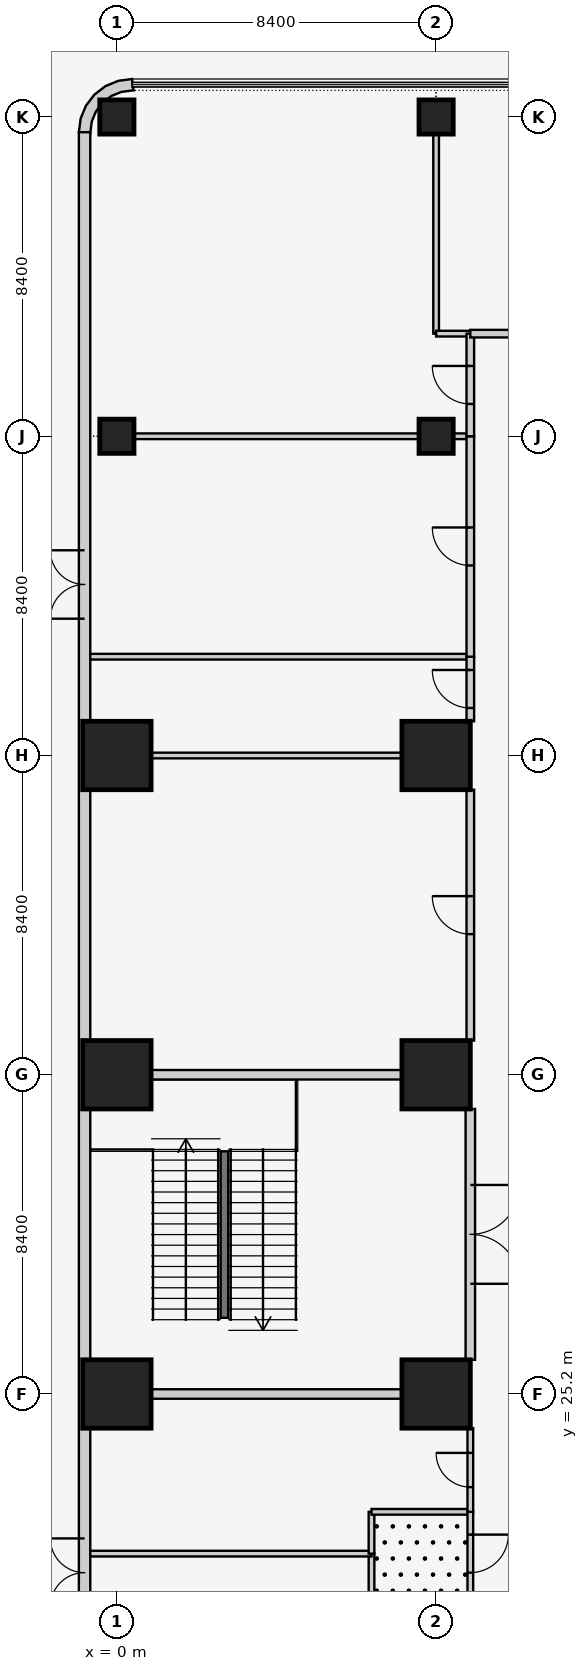
"""IFC4 building model, lengths in metres.
Left out: names, types, materials, properties, quantities, classifications, styles, units other than length and angle.
Written with IfcOpenShell. Run it as: python <this file> out.ifc"""

import sys

from ifc_helpers import new_model, si_unit, direction, frame, frame_2d, origin, origin_2d, place, context, subcontext, project, spatial, polyline, rectangle, outline, extrude, element, fill, save


model = new_model("IFC4")
c1 = context("Model", 3, precision=1e-05, world=origin(), true_north=direction((0.0, 1.0)))
c2 = subcontext(c1, "Body", "Model", "MODEL_VIEW")
j1 = project(units=[si_unit("LENGTHUNIT", "METRE"), si_unit("PLANEANGLEUNIT", "RADIAN")], contexts=[c1])
p1 = place(None, origin())
s1 = spatial("IfcSite", under=j1, at=p1, CompositionType="ELEMENT")
p2 = place(p1, origin())
s2 = spatial("IfcBuilding", under=s1, at=p2, CompositionType="ELEMENT")
p3 = place(p2, origin())
s3 = spatial("IfcBuildingStorey", under=s2, at=p3, CompositionType="ELEMENT", Elevation=0.0)
for number, where, z_axis, x_axis in (
    (1, (0.0, 25.2, 0.0), (0.0, 0.0, 1.0), (1.0, 0.0, 0.0)),
    (2, (0.0, 33.6, 0.0), (0.0, 0.0, 1.0), (1.0, 0.0, 0.0)),
    (3, (0.0, 42.0, 0.0), (0.0, 0.0, 1.0), (1.0, 0.0, 0.0)),
):
    element("IfcColumn", number, at=place(p3, frame(where, z_axis=z_axis, x_axis=x_axis)), inside=s3, PredefinedType="COLUMN", context=c2, shape_type="SweptSolid", body=[
        extrude(rectangle(XDim=1.8, YDim=1.8, at=origin_2d()), origin(), (0.0, 0.0, 1.0), 6.0),
    ])
for number, where, z_axis, x_axis in (
    (4, (0.0, 50.4, 0.0), (0.0, 0.0, 1.0), (1.0, 0.0, 0.0)),
    (5, (0.0, 58.8, 0.0), (0.0, 0.0, 1.0), (1.0, 0.0, 0.0)),
):
    element("IfcColumn", number, at=place(p3, frame(where, z_axis=z_axis, x_axis=x_axis)), inside=s3, PredefinedType="COLUMN", context=c2, shape_type="SweptSolid", body=[
        extrude(rectangle(XDim=0.9, YDim=0.9, at=origin_2d()), origin(), (0.0, 0.0, 1.0), 6.0),
    ])
for number, where, z_axis, x_axis in (
    (6, (8.4, 25.2, 0.0), (0.0, 0.0, 1.0), (1.0, 0.0, 0.0)),
    (7, (8.4, 33.6, 0.0), (0.0, 0.0, 1.0), (1.0, 0.0, 0.0)),
    (8, (8.4, 42.0, 0.0), (0.0, 0.0, 1.0), (1.0, 0.0, 0.0)),
):
    element("IfcColumn", number, at=place(p3, frame(where, z_axis=z_axis, x_axis=x_axis)), inside=s3, PredefinedType="COLUMN", context=c2, shape_type="SweptSolid", body=[
        extrude(rectangle(XDim=1.8, YDim=1.8, at=origin_2d()), origin(), (0.0, 0.0, 1.0), 6.0),
    ])
for number, where, z_axis, x_axis in (
    (9, (8.4, 50.4, 0.0), (0.0, 0.0, 1.0), (1.0, 0.0, 0.0)),
    (10, (8.4, 58.8, 0.0), (0.0, 0.0, 1.0), (1.0, 0.0, 0.0)),
):
    element("IfcColumn", number, at=place(p3, frame(where, z_axis=z_axis, x_axis=x_axis)), inside=s3, PredefinedType="COLUMN", context=c2, shape_type="SweptSolid", body=[
        extrude(rectangle(XDim=0.9, YDim=0.9, at=origin_2d()), origin(), (0.0, 0.0, 1.0), 6.0),
    ])
p4 = place(p3, frame((-0.85, 58.4, 0.0), z_axis=(0.0, 0.0, 1.0), x_axis=(0.0, -1.0, 0.0)))
e11 = element("IfcWall", 11, at=p4, inside=s3, PredefinedType="SOLIDWALL", context=c2, shape_type="SweptSolid", body=[
    extrude(rectangle(XDim=74.8, YDim=0.3, at=frame_2d((37.4, 0.0))), origin(), (0.0, 0.0, 1.0), 5.8),
])
p5 = place(p4, frame((68.0, 0.0, 0.0)))
e12 = element("IfcOpeningElement", 12, at=p5, cuts=e11, PredefinedType="OPENING", context=c2, shape_type="SweptSolid", body=[
    extrude(rectangle(XDim=1.8, YDim=2.4, at=frame_2d((0.9, 1.2))), frame((0.0, 0.16, 0.0), z_axis=(0.0, -1.0, 0.0), x_axis=(1.0, 0.0, 0.0)), (0.0, 0.0, 1.0), 0.32),
])
p6 = place(p4, frame((37.0, 0.0, 0.0)))
e13 = element("IfcOpeningElement", 13, at=p6, cuts=e11, PredefinedType="OPENING", context=c2, shape_type="SweptSolid", body=[
    extrude(rectangle(XDim=1.8, YDim=2.4, at=frame_2d((0.9, 1.2))), frame((0.0, 0.16, 0.0), z_axis=(0.0, -1.0, 0.0), x_axis=(1.0, 0.0, 0.0)), (0.0, 0.0, 1.0), 0.32),
])
p7 = place(p4, frame((11.0, 0.0, 0.0)))
e14 = element("IfcOpeningElement", 14, at=p7, cuts=e11, PredefinedType="OPENING", context=c2, shape_type="SweptSolid", body=[
    extrude(rectangle(XDim=1.8, YDim=2.4, at=frame_2d((0.9, 1.2))), frame((0.0, 0.16, 0.0), z_axis=(0.0, -1.0, 0.0), x_axis=(1.0, 0.0, 0.0)), (0.0, 0.0, 1.0), 0.32),
])
p8 = place(p3, frame((0.445, 59.648, 0.0), z_axis=(0.0, 0.0, 1.0), x_axis=(-0.707106781187, 0.707106781187, 0.0)))
e15 = element("IfcWall", 15, at=p8, inside=s3, PredefinedType="SOLIDWALL", context=c2, shape_type="SweptSolid", body=[
    extrude(outline(polyline([(0.139, 1.904), (-0.101, 1.72), (-0.087, 1.706), (0.1, 1.463), (0.209, 1.198), (0.247, 0.914), (0.209, 0.63), (0.1, 0.365), (-0.087, 0.122), (-0.101, 0.108), (0.139, -0.076), (0.362, 0.214), (0.502, 0.552), (0.549, 0.914), (0.502, 1.276), (0.362, 1.614), (0.139, 1.904)])), origin(), (0.0, 0.0, 1.0), 5.8),
])
p9 = place(p3, frame((6.7, 21.0, 0.0), z_axis=(0.0, 0.0, 1.0), x_axis=(0.0, -1.0, 0.0)))
e16 = element("IfcWall", 16, at=p9, inside=s3, PredefinedType="PARTITIONING", context=c2, shape_type="SweptSolid", body=[
    extrude(rectangle(XDim=1.1, YDim=0.15, at=frame_2d((0.55, 0.0))), origin(), (0.0, 0.0, 1.0), 5.8),
])
p10 = place(p3, frame((-0.7, 21.0, 0.0), z_axis=(0.0, 0.0, 1.0), x_axis=(1.0, 0.0, 0.0)))
e17 = element("IfcWall", 17, at=p10, inside=s3, PredefinedType="PARTITIONING", context=c2, shape_type="SweptSolid", body=[
    extrude(rectangle(XDim=7.4, YDim=0.15, at=frame_2d((3.7, 0.0))), origin(), (0.0, 0.0, 1.0), 5.8),
])
p11 = place(p3, frame((6.7, 21.0, 0.0), z_axis=(0.0, 0.0, 1.0), x_axis=(0.0, 1.0, 0.0)))
e18 = element("IfcWall", 18, at=p11, inside=s3, PredefinedType="PARTITIONING", context=c2, shape_type="SweptSolid", body=[
    extrude(rectangle(XDim=1.1, YDim=0.15, at=frame_2d((0.55, 0.0))), origin(), (0.0, 0.0, 1.0), 5.8),
])
p12 = place(p3, frame((6.7, 22.1, 0.0), z_axis=(0.0, 0.0, 1.0), x_axis=(1.0, 0.0, 0.0)))
e19 = element("IfcWall", 19, at=p12, inside=s3, PredefinedType="PARTITIONING", context=c2, shape_type="SweptSolid", body=[
    extrude(rectangle(XDim=2.6, YDim=0.15, at=frame_2d((1.3, 0.0))), origin(), (0.0, 0.0, 1.0), 5.8),
])
p13 = place(p3, frame((9.3, 22.1, 0.0), z_axis=(0.0, 0.0, 1.0), x_axis=(0.0, -1.0, 0.0)))
e20 = element("IfcWall", 20, at=p13, inside=s3, PredefinedType="PARTITIONING", context=c2, shape_type="SweptSolid", body=[
    extrude(rectangle(XDim=2.2, YDim=0.15, at=frame_2d((1.1, 0.0))), origin(), (0.0, 0.0, 1.0), 5.8),
])
p14 = place(p13, frame((0.6, 0.0, 0.0)))
e21 = element("IfcOpeningElement", 21, at=p14, cuts=e20, PredefinedType="OPENING", context=c2, shape_type="SweptSolid", body=[
    extrude(rectangle(XDim=1.0, YDim=2.1, at=frame_2d((0.5, 1.05))), frame((0.0, 0.085, 0.0), z_axis=(0.0, -1.0, 0.0), x_axis=(1.0, 0.0, 0.0)), (0.0, 0.0, 1.0), 0.17),
])
p15 = place(p3, frame((0.9, 25.2, 0.0), z_axis=(0.0, 0.0, 1.0), x_axis=(1.0, 0.0, 0.0)))
e22 = element("IfcWall", 22, at=p15, inside=s3, PredefinedType="SOLIDWALL", context=c2, shape_type="SweptSolid", body=[
    extrude(rectangle(XDim=6.6, YDim=0.25, at=frame_2d((3.3, 0.0))), origin(), (0.0, 0.0, 1.0), 5.043),
])
p16 = place(p3, frame((9.3, 24.3, 0.0), z_axis=(0.0, 0.0, 1.0), x_axis=(0.0, -1.0, 0.0)))
e23 = element("IfcWall", 23, at=p16, inside=s3, PredefinedType="PARTITIONING", context=c2, shape_type="SweptSolid", body=[
    extrude(rectangle(XDim=2.2, YDim=0.15, at=frame_2d((1.1, 0.0))), origin(), (0.0, 0.0, 1.0), 5.8),
])
p17 = place(p16, frame((0.65, 0.0, 0.0)))
e24 = element("IfcOpeningElement", 24, at=p17, cuts=e23, PredefinedType="OPENING", context=c2, shape_type="SweptSolid", body=[
    extrude(rectangle(XDim=0.9, YDim=2.1, at=frame_2d((0.45, 1.05))), frame((0.0, 0.085, 0.0), z_axis=(0.0, -1.0, 0.0), x_axis=(1.0, 0.0, 0.0)), (0.0, 0.0, 1.0), 0.17),
])
p18 = place(p3, frame((0.9, 33.6, 0.0), z_axis=(0.0, 0.0, 1.0), x_axis=(1.0, 0.0, 0.0)))
e25 = element("IfcWall", 25, at=p18, inside=s3, PredefinedType="SOLIDWALL", context=c2, shape_type="SweptSolid", body=[
    extrude(rectangle(XDim=6.6, YDim=0.25, at=frame_2d((3.3, 0.0))), origin(), (0.0, 0.0, 1.0), 5.043),
])
p19 = place(p3, frame((9.3, 32.7, 0.0), z_axis=(0.0, 0.0, 1.0), x_axis=(0.0, -1.0, 0.0)))
e26 = element("IfcWall", 26, at=p19, inside=s3, PredefinedType="SOLIDWALL", context=c2, shape_type="SweptSolid", body=[
    extrude(rectangle(XDim=6.6, YDim=0.25, at=frame_2d((3.3, 0.0))), origin(), (0.0, 0.0, 1.0), 5.8),
])
p20 = place(p19, frame((2.0, 0.0, 0.0)))
e27 = element("IfcOpeningElement", 27, at=p20, cuts=e26, PredefinedType="OPENING", context=c2, shape_type="SweptSolid", body=[
    extrude(rectangle(XDim=2.6, YDim=2.4, at=frame_2d((1.3, 1.2))), frame((0.0, 0.135, 0.0), z_axis=(0.0, -1.0, 0.0), x_axis=(1.0, 0.0, 0.0)), (0.0, 0.0, 1.0), 0.27),
])
p21 = place(p3, frame((0.9, 42.0, 0.0), z_axis=(0.0, 0.0, 1.0), x_axis=(1.0, 0.0, 0.0)))
e28 = element("IfcWall", 28, at=p21, inside=s3, PredefinedType="PARTITIONING", context=c2, shape_type="SweptSolid", body=[
    extrude(rectangle(XDim=6.6, YDim=0.15, at=frame_2d((3.3, 0.0))), origin(), (0.0, 0.0, 1.0), 5.043),
])
p22 = place(p3, frame((9.3, 41.1, 0.0), z_axis=(0.0, 0.0, 1.0), x_axis=(0.0, -1.0, 0.0)))
e29 = element("IfcWall", 29, at=p22, inside=s3, PredefinedType="PARTITIONING", context=c2, shape_type="SweptSolid", body=[
    extrude(rectangle(XDim=6.6, YDim=0.2, at=frame_2d((3.3, 0.0))), origin(), (0.0, 0.0, 1.0), 5.8),
])
p23 = place(p22, frame((2.8, 0.0, 0.0)))
e30 = element("IfcOpeningElement", 30, at=p23, cuts=e29, PredefinedType="OPENING", context=c2, shape_type="SweptSolid", body=[
    extrude(rectangle(XDim=1.0, YDim=2.1, at=frame_2d((0.5, 1.05))), frame((0.0, 0.11, 0.0), z_axis=(0.0, -1.0, 0.0), x_axis=(1.0, 0.0, 0.0)), (0.0, 0.0, 1.0), 0.22),
])
p24 = place(p3, frame((-0.7, 44.6, 0.0), z_axis=(0.0, 0.0, 1.0), x_axis=(1.0, 0.0, 0.0)))
e31 = element("IfcWall", 31, at=p24, inside=s3, PredefinedType="PARTITIONING", context=c2, shape_type="SweptSolid", body=[
    extrude(rectangle(XDim=10.0, YDim=0.15, at=frame_2d((5.0, 0.0))), origin(), (0.0, 0.0, 1.0), 5.8),
])
p25 = place(p3, frame((9.3, 44.6, 0.0), z_axis=(0.0, 0.0, 1.0), x_axis=(0.0, -1.0, 0.0)))
e32 = element("IfcWall", 32, at=p25, inside=s3, PredefinedType="PARTITIONING", context=c2, shape_type="SweptSolid", body=[
    extrude(rectangle(XDim=1.7, YDim=0.2, at=frame_2d((0.85, 0.0))), origin(), (0.0, 0.0, 1.0), 5.8),
])
p26 = place(p25, frame((0.35, 0.0, 0.0)))
e33 = element("IfcOpeningElement", 33, at=p26, cuts=e32, PredefinedType="OPENING", context=c2, shape_type="SweptSolid", body=[
    extrude(rectangle(XDim=1.0, YDim=2.1, at=frame_2d((0.5, 1.05))), frame((0.0, 0.11, 0.0), z_axis=(0.0, -1.0, 0.0), x_axis=(1.0, 0.0, 0.0)), (0.0, 0.0, 1.0), 0.22),
])
p27 = place(p3, frame((0.45, 50.4, 0.0), z_axis=(0.0, 0.0, 1.0), x_axis=(1.0, 0.0, 0.0)))
e34 = element("IfcWall", 34, at=p27, inside=s3, PredefinedType="PARTITIONING", context=c2, shape_type="SweptSolid", body=[
    extrude(rectangle(XDim=7.5, YDim=0.15, at=frame_2d((3.75, 0.0))), origin(), (0.0, 0.0, 1.0), 5.043),
])
p28 = place(p3, frame((8.85, 50.4, 0.0), z_axis=(0.0, 0.0, 1.0), x_axis=(1.0, 0.0, 0.0)))
e35 = element("IfcWall", 35, at=p28, inside=s3, PredefinedType="PARTITIONING", context=c2, shape_type="SweptSolid", body=[
    extrude(rectangle(XDim=0.45, YDim=0.15, at=frame_2d((0.225, 0.0))), origin(), (0.0, 0.0, 1.0), 5.043),
])
p29 = place(p3, frame((9.3, 50.4, 0.0), z_axis=(0.0, 0.0, 1.0), x_axis=(0.0, -1.0, 0.0)))
e36 = element("IfcWall", 36, at=p29, inside=s3, PredefinedType="PARTITIONING", context=c2, shape_type="SweptSolid", body=[
    extrude(rectangle(XDim=5.8, YDim=0.2, at=frame_2d((2.9, 0.0))), origin(), (0.0, 0.0, 1.0), 5.8),
])
p30 = place(p29, frame((2.4, 0.0, 0.0)))
e37 = element("IfcOpeningElement", 37, at=p30, cuts=e36, PredefinedType="OPENING", context=c2, shape_type="SweptSolid", body=[
    extrude(rectangle(XDim=1.0, YDim=2.1, at=frame_2d((0.5, 1.05))), frame((0.0, 0.11, 0.0), z_axis=(0.0, -1.0, 0.0), x_axis=(1.0, 0.0, 0.0)), (0.0, 0.0, 1.0), 0.22),
])
p31 = place(p3, frame((8.4, 58.35, 0.0), z_axis=(0.0, 0.0, 1.0), x_axis=(0.0, -1.0, 0.0)))
e38 = element("IfcWall", 38, at=p31, inside=s3, PredefinedType="PARTITIONING", context=c2, shape_type="SweptSolid", body=[
    extrude(rectangle(XDim=5.25, YDim=0.15, at=frame_2d((2.625, 0.0))), origin(), (0.0, 0.0, 1.0), 5.043),
])
p32 = place(p3, frame((8.4, 53.1, 0.0), z_axis=(0.0, 0.0, 1.0), x_axis=(1.0, 0.0, 0.0)))
e39 = element("IfcWall", 39, at=p32, inside=s3, PredefinedType="PARTITIONING", context=c2, shape_type="SweptSolid", body=[
    extrude(rectangle(XDim=0.9, YDim=0.15, at=frame_2d((0.45, 0.0))), origin(), (0.0, 0.0, 1.0), 5.8),
])
p33 = place(p3, frame((9.3, 53.1, 0.0), z_axis=(0.0, 0.0, 1.0), x_axis=(0.0, -1.0, 0.0)))
e40 = element("IfcWall", 40, at=p33, inside=s3, PredefinedType="PARTITIONING", context=c2, shape_type="SweptSolid", body=[
    extrude(rectangle(XDim=2.7, YDim=0.2, at=frame_2d((1.35, 0.0))), origin(), (0.0, 0.0, 1.0), 5.8),
])
p34 = place(p33, frame((0.85, 0.0, 0.0)))
e41 = element("IfcOpeningElement", 41, at=p34, cuts=e40, PredefinedType="OPENING", context=c2, shape_type="SweptSolid", body=[
    extrude(rectangle(XDim=1.0, YDim=2.1, at=frame_2d((0.5, 1.05))), frame((0.0, 0.11, 0.0), z_axis=(0.0, -1.0, 0.0), x_axis=(1.0, 0.0, 0.0)), (0.0, 0.0, 1.0), 0.22),
])
p35 = place(p3, frame((11.7, 53.1, 0.0), z_axis=(0.0, 0.0, 1.0), x_axis=(-1.0, 0.0, 0.0)))
e42 = element("IfcWall", 42, at=p35, inside=s3, PredefinedType="PARTITIONING", context=c2, shape_type="SweptSolid", body=[
    extrude(rectangle(XDim=2.4, YDim=0.2, at=frame_2d((1.2, 0.0))), origin(), (0.0, 0.0, 1.0), 5.8),
])
p36 = place(p3, frame((2.83, 27.205, 0.0), z_axis=(0.0, 0.0, 1.0), x_axis=(0.0, 1.0, 0.0)))
e43 = element("IfcWall", 43, at=p36, inside=s3, PredefinedType="SOLIDWALL", context=c2, shape_type="SweptSolid", body=[
    extrude(rectangle(XDim=4.38, YDim=0.2, at=frame_2d((2.19, 0.0))), origin(), (0.0, 0.0, 1.0), 6.0),
])
p37 = place(p6, frame((1.8, 0.0, 0.0), z_axis=(0.0, 0.0, 1.0), x_axis=(-1.0, 0.0, 0.0)))
e44 = element("IfcDoor", 44, at=p37, inside=s3, OperationType="DOUBLE_DOOR_SINGLE_SWING", PredefinedType="DOOR", context=c2, shape_type="SweptSolid", body=[
    extrude(rectangle(XDim=1.8, YDim=2.4, at=frame_2d((0.9, 1.2))), frame((0.0, 0.025, 0.0), z_axis=(0.0, -1.0, 0.0), x_axis=(1.0, 0.0, 0.0)), (0.0, 0.0, 1.0), 0.05),
])
fill(e13, e44)
p38 = place(p7, frame((1.8, 0.0, 0.0), z_axis=(0.0, 0.0, 1.0), x_axis=(-1.0, 0.0, 0.0)))
e45 = element("IfcDoor", 45, at=p38, inside=s3, OperationType="DOUBLE_DOOR_SINGLE_SWING", PredefinedType="DOOR", context=c2, shape_type="SweptSolid", body=[
    extrude(rectangle(XDim=1.8, YDim=2.4, at=frame_2d((0.9, 1.2))), frame((0.0, 0.025, 0.0), z_axis=(0.0, -1.0, 0.0), x_axis=(1.0, 0.0, 0.0)), (0.0, 0.0, 1.0), 0.05),
])
fill(e14, e45)
p39 = place(p14, origin())
e46 = element("IfcDoor", 46, at=p39, inside=s3, OperationType="SINGLE_SWING_LEFT", PredefinedType="DOOR", context=c2, shape_type="SweptSolid", body=[
    extrude(rectangle(XDim=1.0, YDim=2.1, at=frame_2d((0.5, 1.05))), frame((0.0, 0.025, 0.0), z_axis=(0.0, -1.0, 0.0), x_axis=(1.0, 0.0, 0.0)), (0.0, 0.0, 1.0), 0.05),
])
fill(e21, e46)
p40 = place(p17, frame((0.9, 0.0, 0.0), z_axis=(0.0, 0.0, 1.0), x_axis=(-1.0, 0.0, 0.0)))
e47 = element("IfcDoor", 47, at=p40, inside=s3, OperationType="SINGLE_SWING_RIGHT", PredefinedType="DOOR", context=c2, shape_type="SweptSolid", body=[
    extrude(rectangle(XDim=0.9, YDim=2.1, at=frame_2d((0.45, 1.05))), frame((0.0, 0.025, 0.0), z_axis=(0.0, -1.0, 0.0), x_axis=(1.0, 0.0, 0.0)), (0.0, 0.0, 1.0), 0.05),
])
fill(e24, e47)
p41 = place(p20, origin())
e48 = element("IfcDoor", 48, at=p41, inside=s3, OperationType="DOUBLE_DOOR_SINGLE_SWING", PredefinedType="DOOR", context=c2, shape_type="SweptSolid", body=[
    extrude(rectangle(XDim=2.6, YDim=2.4, at=frame_2d((1.3, 1.2))), frame((0.0, 0.025, 0.0), z_axis=(0.0, -1.0, 0.0), x_axis=(1.0, 0.0, 0.0)), (0.0, 0.0, 1.0), 0.05),
])
fill(e27, e48)
p42 = place(p23, frame((1.0, 0.0, 0.0), z_axis=(0.0, 0.0, 1.0), x_axis=(-1.0, 0.0, 0.0)))
e49 = element("IfcDoor", 49, at=p42, inside=s3, OperationType="SINGLE_SWING_RIGHT", PredefinedType="DOOR", context=c2, shape_type="SweptSolid", body=[
    extrude(rectangle(XDim=1.0, YDim=2.1, at=frame_2d((0.5, 1.05))), frame((0.0, 0.025, 0.0), z_axis=(0.0, -1.0, 0.0), x_axis=(1.0, 0.0, 0.0)), (0.0, 0.0, 1.0), 0.05),
])
fill(e30, e49)
p43 = place(p26, frame((1.0, 0.0, 0.0), z_axis=(0.0, 0.0, 1.0), x_axis=(-1.0, 0.0, 0.0)))
e50 = element("IfcDoor", 50, at=p43, inside=s3, OperationType="SINGLE_SWING_RIGHT", PredefinedType="DOOR", context=c2, shape_type="SweptSolid", body=[
    extrude(rectangle(XDim=1.0, YDim=2.1, at=frame_2d((0.5, 1.05))), frame((0.0, 0.025, 0.0), z_axis=(0.0, -1.0, 0.0), x_axis=(1.0, 0.0, 0.0)), (0.0, 0.0, 1.0), 0.05),
])
fill(e33, e50)
p44 = place(p30, frame((1.0, 0.0, 0.0), z_axis=(0.0, 0.0, 1.0), x_axis=(-1.0, 0.0, 0.0)))
e51 = element("IfcDoor", 51, at=p44, inside=s3, OperationType="SINGLE_SWING_RIGHT", PredefinedType="DOOR", context=c2, shape_type="SweptSolid", body=[
    extrude(rectangle(XDim=1.0, YDim=2.1, at=frame_2d((0.5, 1.05))), frame((0.0, 0.025, 0.0), z_axis=(0.0, -1.0, 0.0), x_axis=(1.0, 0.0, 0.0)), (0.0, 0.0, 1.0), 0.05),
])
fill(e37, e51)
p45 = place(p34, frame((1.0, 0.0, 0.0), z_axis=(0.0, 0.0, 1.0), x_axis=(-1.0, 0.0, 0.0)))
e52 = element("IfcDoor", 52, at=p45, inside=s3, OperationType="SINGLE_SWING_RIGHT", PredefinedType="DOOR", context=c2, shape_type="SweptSolid", body=[
    extrude(rectangle(XDim=1.0, YDim=2.1, at=frame_2d((0.5, 1.05))), frame((0.0, 0.025, 0.0), z_axis=(0.0, -1.0, 0.0), x_axis=(1.0, 0.0, 0.0)), (0.0, 0.0, 1.0), 0.05),
])
fill(e41, e52)
save(model, sys.argv[1])
